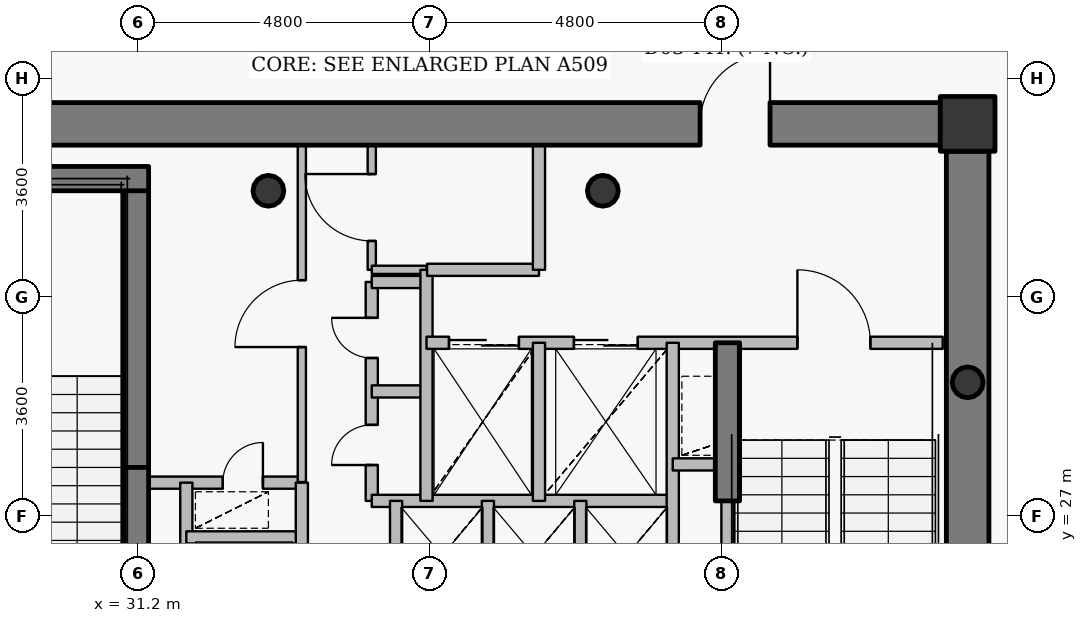
"""IFC4 building model, lengths in metres.
Left out: names, types, materials, properties, quantities, classifications, styles, units other than length and angle.
Written with IfcOpenShell. Run it as: python <this file> out.ifc"""

import sys

from ifc_helpers import new_model, si_unit, direction, frame, frame_2d, origin, origin_2d, place, context, subcontext, project, spatial, rectangle, hollow_circle, extrude, source, transform, mapped, element, fill, save


model = new_model("IFC4")
c1 = context("Model", 3, precision=1e-05, world=origin(), true_north=direction((0.0, 1.0)))
c2 = subcontext(c1, "Body", "Model", "MODEL_VIEW")
j1 = project(units=[si_unit("LENGTHUNIT", "METRE"), si_unit("PLANEANGLEUNIT", "RADIAN")], contexts=[c1])
p1 = place(None, origin())
s1 = spatial("IfcSite", under=j1, at=p1, CompositionType="ELEMENT")
p2 = place(p1, origin())
s2 = spatial("IfcBuilding", under=s1, at=p2, CompositionType="ELEMENT")
p3 = place(p2, frame((0.0, 0.0, 331.6)))
s3 = spatial("IfcBuildingStorey", under=s2, at=p3, CompositionType="ELEMENT", Elevation=331.6)
p4 = place(p3, frame((44.85, 33.45, 0.0), z_axis=(0.0, 0.0, 1.0), x_axis=(1.0, 0.0, 0.0)))
e1 = element("IfcColumn", 1, at=p4, inside=s3, PredefinedType="COLUMN", context=c2, shape_type="SweptSolid", body=[
    extrude(rectangle(XDim=0.9, YDim=0.9, at=origin_2d()), origin(), (0.0, 0.0, 1.0), 3.8),
])
for number, where, z_axis, x_axis in (
    (2, (38.85, 32.35, 0.0), (0.0, 0.0, 1.0), (1.0, 0.0, 0.0)),
    (3, (33.35, 32.35, 0.0), (0.0, 0.0, 1.0), (1.0, 0.0, 0.0)),
):
    element("IfcColumn", number, at=place(p3, frame(where, z_axis=z_axis, x_axis=x_axis)), inside=s3, PredefinedType="COLUMN", context=c2, shape_type="SweptSolid", body=[
        extrude(hollow_circle(Radius=0.254, WallThickness=0.02, at=origin_2d()), origin(), (0.0, 0.0, 1.0), 3.8),
    ])
p5 = place(p3, frame((31.18, 27.8, 0.0), z_axis=(0.0, 0.0, 1.0), x_axis=(0.0, 1.0, 0.0)))
e4 = element("IfcWall", 4, at=p5, inside=s3, PredefinedType="SHEAR", context=c2, shape_type="SweptSolid", body=[
    extrude(rectangle(XDim=4.75, YDim=0.4, at=frame_2d((2.375, 0.0))), origin(), (0.0, 0.0, 1.0), 3.8),
])
p6 = place(p3, frame((27.25, 32.55, 0.0), z_axis=(0.0, 0.0, 1.0), x_axis=(1.0, 0.0, 0.0)))
e5 = element("IfcWall", 5, at=p6, inside=s3, PredefinedType="SHEAR", context=c2, shape_type="SweptSolid", body=[
    extrude(rectangle(XDim=4.13, YDim=0.4, at=frame_2d((2.065, 0.0))), origin(), (0.0, 0.0, 1.0), 3.8),
])
p7 = place(p3, frame((27.6, 33.45, 0.0), z_axis=(0.0, 0.0, 1.0), x_axis=(1.0, 0.0, 0.0)))
e6 = element("IfcWall", 6, at=p7, inside=s3, PredefinedType="SHEAR", context=c2, shape_type="SweptSolid", body=[
    extrude(rectangle(XDim=16.8, YDim=0.7, at=frame_2d((8.4, 0.0))), origin(), (0.0, 0.0, 1.0), 3.1),
])
p8 = place(p7, frame((12.85, 0.0, 0.0)))
e7 = element("IfcOpeningElement", 7, at=p8, cuts=e6, PredefinedType="OPENING", context=c2, shape_type="SweptSolid", body=[
    extrude(rectangle(XDim=1.15, YDim=2.15, at=origin_2d()), frame((0.575, 0.36, 1.075), z_axis=(0.0, -1.0, 0.0), x_axis=(1.0, 0.0, 0.0)), (0.0, 0.0, 1.0), 0.72),
])
p9 = place(p3, frame((44.85, 33.0, 0.0), z_axis=(0.0, 0.0, 1.0), x_axis=(0.0, -1.0, 0.0)))
e8 = element("IfcWall", 8, at=p9, inside=s3, PredefinedType="SHEAR", context=c2, shape_type="SweptSolid", body=[
    extrude(rectangle(XDim=12.0, YDim=0.7, at=frame_2d((6.0, 0.0))), origin(), (0.0, 0.0, 1.0), 3.1),
])
p10 = place(p3, frame((31.18, 25.55, 0.0), z_axis=(0.0, 0.0, 1.0), x_axis=(0.0, 1.0, 0.0)))
e9 = element("IfcWall", 9, at=p10, inside=s3, PredefinedType="SHEAR", context=c2, shape_type="SweptSolid", body=[
    extrude(rectangle(XDim=2.25, YDim=0.4, at=frame_2d((1.125, 0.0))), origin(), (0.0, 0.0, 1.0), 3.15),
])
p11 = place(p3, frame((40.9, 27.25, 0.0), z_axis=(0.0, 0.0, 1.0), x_axis=(0.0, 1.0, 0.0)))
e10 = element("IfcWall", 10, at=p11, inside=s3, PredefinedType="SHEAR", context=c2, shape_type="SweptSolid", body=[
    extrude(rectangle(XDim=2.6, YDim=0.4, at=frame_2d((1.3, 0.0))), origin(), (0.0, 0.0, 1.0), 3.15),
])
p12 = place(p3, frame((44.85, 29.2, 0.0), z_axis=(0.0, 0.0, 1.0), x_axis=(1.0, 0.0, 0.0)))
e11 = element("IfcColumn", 11, at=p12, inside=s3, PredefinedType="COLUMN", context=c2, shape_type="SweptSolid", body=[
    extrude(hollow_circle(Radius=0.254, WallThickness=0.02, at=origin_2d()), origin(), (0.0, 0.0, 1.0), 3.8),
])
p13 = place(p3, frame((31.1, 27.55, 0.0), z_axis=(0.0, 0.0, 1.0), x_axis=(1.0, 0.0, 0.0)))
e12 = element("IfcWall", 12, at=p13, inside=s3, PredefinedType="PARTITIONING", context=c2, shape_type="SweptSolid", body=[
    extrude(rectangle(XDim=2.8, YDim=0.2, at=frame_2d((1.4, 0.0))), origin(), (0.0, 0.0, 1.0), 3.135),
])
p14 = place(p13, frame((1.5, 0.0, 0.0)))
e13 = element("IfcOpeningElement", 13, at=p14, cuts=e12, PredefinedType="OPENING", context=c2, shape_type="SweptSolid", body=[
    extrude(rectangle(XDim=0.66, YDim=2.05, at=origin_2d()), frame((0.33, 0.11, 1.025), z_axis=(0.0, -1.0, 0.0), x_axis=(1.0, 0.0, 0.0)), (0.0, 0.0, 1.0), 0.22),
])
p15 = place(p3, frame((32.0, 24.1, 0.0), z_axis=(0.0, 0.0, 1.0), x_axis=(0.0, 1.0, 0.0)))
e14 = element("IfcWall", 14, at=p15, inside=s3, PredefinedType="PARTITIONING", context=c2, shape_type="SweptSolid", body=[
    extrude(rectangle(XDim=3.45, YDim=0.2, at=frame_2d((1.725, 0.0))), origin(), (0.0, 0.0, 1.0), 3.55),
])
p16 = place(p3, frame((32.0, 26.65, 0.0), z_axis=(0.0, 0.0, 1.0), x_axis=(1.0, 0.0, 0.0)))
e15 = element("IfcWall", 15, at=p16, inside=s3, PredefinedType="PARTITIONING", context=c2, shape_type="SweptSolid", body=[
    extrude(rectangle(XDim=1.9, YDim=0.2, at=frame_2d((0.95, 0.0))), origin(), (0.0, 0.0, 1.0), 3.135),
])
p17 = place(p3, frame((33.9, 20.9, 0.0), z_axis=(0.0, 0.0, 1.0), x_axis=(0.0, 1.0, 0.0)))
e16 = element("IfcWall", 16, at=p17, inside=s3, PredefinedType="PARTITIONING", context=c2, shape_type="SweptSolid", body=[
    extrude(rectangle(XDim=6.65, YDim=0.2, at=frame_2d((3.325, 0.0))), origin(), (0.0, 0.0, 1.0), 3.135),
])
p18 = place(p3, frame((33.9, 27.56, 0.0), z_axis=(0.0, 0.0, 1.0), x_axis=(0.0, 1.0, 0.0)))
e17 = element("IfcWall", 17, at=p18, inside=s3, PredefinedType="PARTITIONING", context=c2, shape_type="SweptSolid", body=[
    extrude(rectangle(XDim=5.54, YDim=0.135, at=frame_2d((2.77, 0.0))), origin(), (0.0, 0.0, 1.0), 3.135),
])
p19 = place(p18, frame((2.22, 0.0, 0.0)))
e18 = element("IfcOpeningElement", 18, at=p19, cuts=e17, PredefinedType="OPENING", context=c2, shape_type="SweptSolid", body=[
    extrude(rectangle(XDim=1.1, YDim=2.15, at=origin_2d()), frame((0.55, 0.078, 1.075), z_axis=(0.0, -1.0, 0.0), x_axis=(1.0, 0.0, 0.0)), (0.0, 0.0, 1.0), 0.155),
])
p20 = place(p3, frame((35.05, 27.25, 0.0), z_axis=(0.0, 0.0, 1.0), x_axis=(0.0, 1.0, 0.0)))
e19 = element("IfcWall", 19, at=p20, inside=s3, PredefinedType="PARTITIONING", context=c2, shape_type="SweptSolid", body=[
    extrude(rectangle(XDim=3.6, YDim=0.2, at=frame_2d((1.8, 0.0))), origin(), (0.0, 0.0, 1.0), 3.55),
])
p21 = place(p20, frame((0.59, 0.0, 0.0)))
e20 = element("IfcOpeningElement", 20, at=p21, cuts=e19, PredefinedType="OPENING", context=c2, shape_type="SweptSolid", body=[
    extrude(rectangle(XDim=0.66, YDim=2.05, at=origin_2d()), frame((0.33, 0.11, 1.025), z_axis=(0.0, -1.0, 0.0), x_axis=(1.0, 0.0, 0.0)), (0.0, 0.0, 1.0), 0.22),
])
p22 = place(p20, frame((2.35, 0.0, 0.0)))
e21 = element("IfcOpeningElement", 21, at=p22, cuts=e19, PredefinedType="OPENING", context=c2, shape_type="SweptSolid", body=[
    extrude(rectangle(XDim=0.66, YDim=2.05, at=origin_2d()), frame((0.33, 0.11, 1.025), z_axis=(0.0, -1.0, 0.0), x_axis=(1.0, 0.0, 0.0)), (0.0, 0.0, 1.0), 0.22),
])
p23 = place(p3, frame((35.05, 27.25, 0.0), z_axis=(0.0, 0.0, 1.0), x_axis=(1.0, 0.0, 0.0)))
e22 = element("IfcWall", 22, at=p23, inside=s3, PredefinedType="PARTITIONING", context=c2, shape_type="SweptSolid", body=[
    extrude(rectangle(XDim=4.95, YDim=0.2, at=frame_2d((2.475, 0.0))), origin(), (0.0, 0.0, 1.0), 3.135),
])
for number, where, z_axis, x_axis in (
    (23, (35.05, 29.05, 0.0), (0.0, 0.0, 1.0), (1.0, 0.0, 0.0)),
    (24, (35.05, 30.85, 0.0), (0.0, 0.0, 1.0), (1.0, 0.0, 0.0)),
):
    element("IfcWall", number, at=place(p3, frame(where, z_axis=z_axis, x_axis=x_axis)), inside=s3, PredefinedType="PARTITIONING", context=c2, shape_type="SweptSolid", body=[
        extrude(rectangle(XDim=0.9, YDim=0.2, at=frame_2d((0.45, 0.0))), origin(), (0.0, 0.0, 1.0), 3.55),
    ])
p24 = place(p3, frame((35.05, 31.05, 0.0), z_axis=(0.0, 0.0, 1.0), x_axis=(0.0, 1.0, 0.0)))
e25 = element("IfcWall", 25, at=p24, inside=s3, PredefinedType="PARTITIONING", context=c2, shape_type="SweptSolid", body=[
    extrude(rectangle(XDim=2.05, YDim=0.135, at=frame_2d((1.025, 0.0))), origin(), (0.0, 0.0, 1.0), 3.135),
])
p25 = place(p24, frame((0.475, 0.0, 0.0)))
e26 = element("IfcOpeningElement", 26, at=p25, cuts=e25, PredefinedType="OPENING", context=c2, shape_type="SweptSolid", body=[
    extrude(rectangle(XDim=1.1, YDim=2.15, at=origin_2d()), frame((0.55, 0.078, 1.075), z_axis=(0.0, -1.0, 0.0), x_axis=(1.0, 0.0, 0.0)), (0.0, 0.0, 1.0), 0.155),
])
p26 = place(p3, frame((35.05, 31.05, 0.0), z_axis=(0.0, 0.0, 1.0), x_axis=(1.0, 0.0, 0.0)))
e27 = element("IfcWall", 27, at=p26, inside=s3, PredefinedType="PARTITIONING", context=c2, shape_type="SweptSolid", body=[
    extrude(rectangle(XDim=0.9, YDim=0.135, at=frame_2d((0.45, 0.0))), origin(), (0.0, 0.0, 1.0), 3.55),
])
p27 = place(p3, frame((35.45, 25.45, 0.0), z_axis=(0.0, 0.0, 1.0), x_axis=(0.0, 1.0, 0.0)))
e28 = element("IfcWall", 28, at=p27, inside=s3, PredefinedType="PARTITIONING", context=c2, shape_type="SweptSolid", body=[
    extrude(rectangle(XDim=1.8, YDim=0.2, at=frame_2d((0.9, 0.0))), origin(), (0.0, 0.0, 1.0), 3.55),
])
p28 = place(p3, frame((35.95, 27.25, 0.0), z_axis=(0.0, 0.0, 1.0), x_axis=(0.0, 1.0, 0.0)))
e29 = element("IfcWall", 29, at=p28, inside=s3, PredefinedType="PARTITIONING", context=c2, shape_type="SweptSolid", body=[
    extrude(rectangle(XDim=3.8, YDim=0.2, at=frame_2d((1.9, 0.0))), origin(), (0.0, 0.0, 1.0), 3.55),
])
p29 = place(p3, frame((35.95, 29.85, 0.0), z_axis=(0.0, 0.0, 1.0), x_axis=(1.0, 0.0, 0.0)))
e30 = element("IfcWall", 30, at=p29, inside=s3, PredefinedType="PARTITIONING", context=c2, shape_type="SweptSolid", body=[
    extrude(rectangle(XDim=8.49, YDim=0.2, at=frame_2d((4.245, 0.0))), origin(), (0.0, 0.0, 1.0), 3.135),
])
p30 = place(p29, frame((6.1, 0.0, 0.0)))
e31 = element("IfcOpeningElement", 31, at=p30, cuts=e30, PredefinedType="OPENING", context=c2, shape_type="SweptSolid", body=[
    extrude(rectangle(XDim=1.2, YDim=2.15, at=origin_2d()), frame((0.6, 0.11, 1.075), z_axis=(0.0, -1.0, 0.0), x_axis=(1.0, 0.0, 0.0)), (0.0, 0.0, 1.0), 0.22),
])
p31 = place(p29, frame((0.37, 0.0, 0.0)))
e32 = element("IfcOpeningElement", 32, at=p31, cuts=e30, PredefinedType="OPENING", context=c2, shape_type="SweptSolid", body=[
    extrude(rectangle(XDim=1.15, YDim=2.15, at=origin_2d()), frame((0.575, 0.11, 1.075), z_axis=(0.0, -1.0, 0.0), x_axis=(1.0, 0.0, 0.0)), (0.0, 0.0, 1.0), 0.22),
])
p32 = place(p29, frame((2.425, 0.0, 0.0)))
e33 = element("IfcOpeningElement", 33, at=p32, cuts=e30, PredefinedType="OPENING", context=c2, shape_type="SweptSolid", body=[
    extrude(rectangle(XDim=1.05, YDim=2.15, at=origin_2d()), frame((0.525, 0.11, 1.075), z_axis=(0.0, -1.0, 0.0), x_axis=(1.0, 0.0, 0.0)), (0.0, 0.0, 1.0), 0.22),
])
p33 = place(p3, frame((35.96, 31.05, 0.0), z_axis=(0.0, 0.0, 1.0), x_axis=(1.0, 0.0, 0.0)))
e34 = element("IfcWall", 34, at=p33, inside=s3, PredefinedType="PARTITIONING", context=c2, shape_type="SweptSolid", body=[
    extrude(rectangle(XDim=1.84, YDim=0.2, at=frame_2d((0.92, 0.0))), origin(), (0.0, 0.0, 1.0), 3.55),
])
p34 = place(p3, frame((36.96, 25.45, 0.0), z_axis=(0.0, 0.0, 1.0), x_axis=(0.0, 1.0, 0.0)))
e35 = element("IfcWall", 35, at=p34, inside=s3, PredefinedType="PARTITIONING", context=c2, shape_type="SweptSolid", body=[
    extrude(rectangle(XDim=1.8, YDim=0.2, at=frame_2d((0.9, 0.0))), origin(), (0.0, 0.0, 1.0), 3.55),
])
p35 = place(p3, frame((37.8, 27.25, 0.0), z_axis=(0.0, 0.0, 1.0), x_axis=(0.0, 1.0, 0.0)))
e36 = element("IfcWall", 36, at=p35, inside=s3, PredefinedType="PARTITIONING", context=c2, shape_type="SweptSolid", body=[
    extrude(rectangle(XDim=2.6, YDim=0.2, at=frame_2d((1.3, 0.0))), origin(), (0.0, 0.0, 1.0), 3.55),
])
p36 = place(p3, frame((37.8, 31.05, 0.0), z_axis=(0.0, 0.0, 1.0), x_axis=(0.0, 1.0, 0.0)))
e37 = element("IfcWall", 37, at=p36, inside=s3, PredefinedType="PARTITIONING", context=c2, shape_type="SweptSolid", body=[
    extrude(rectangle(XDim=2.05, YDim=0.2, at=frame_2d((1.025, 0.0))), origin(), (0.0, 0.0, 1.0), 3.135),
])
p37 = place(p3, frame((38.48, 25.45, 0.0), z_axis=(0.0, 0.0, 1.0), x_axis=(0.0, 1.0, 0.0)))
e38 = element("IfcWall", 38, at=p37, inside=s3, PredefinedType="PARTITIONING", context=c2, shape_type="SweptSolid", body=[
    extrude(rectangle(XDim=1.8, YDim=0.2, at=frame_2d((0.9, 0.0))), origin(), (0.0, 0.0, 1.0), 3.55),
])
p38 = place(p3, frame((40.0, 25.45, 0.0), z_axis=(0.0, 0.0, 1.0), x_axis=(0.0, 1.0, 0.0)))
e39 = element("IfcWall", 39, at=p38, inside=s3, PredefinedType="PARTITIONING", context=c2, shape_type="SweptSolid", body=[
    extrude(rectangle(XDim=4.4, YDim=0.2, at=frame_2d((2.2, 0.0))), origin(), (0.0, 0.0, 1.0), 3.55),
])
p39 = place(p3, frame((40.0, 27.85, 0.0), z_axis=(0.0, 0.0, 1.0), x_axis=(1.0, 0.0, 0.0)))
e40 = element("IfcWall", 40, at=p39, inside=s3, PredefinedType="PARTITIONING", context=c2, shape_type="SweptSolid", body=[
    extrude(rectangle(XDim=0.9, YDim=0.2, at=frame_2d((0.45, 0.0))), origin(), (0.0, 0.0, 1.0), 3.55),
])
p40 = place(p3, frame((40.9, 21.33, 0.0), z_axis=(0.0, 0.0, 1.0), x_axis=(0.0, 1.0, 0.0)))
e41 = element("IfcWall", 41, at=p40, inside=s3, PredefinedType="PARTITIONING", context=c2, shape_type="SweptSolid", body=[
    extrude(rectangle(XDim=5.91, YDim=0.2, at=frame_2d((2.955, 0.0))), origin(), (0.0, 0.0, 1.0), 3.085),
])
p41 = place(p3, frame((45.2, 33.8, 0.0), z_axis=(0.0, 0.0, 1.0), x_axis=(-1.0, 0.0, 0.0)))
e42 = element("IfcWall", 42, at=p41, inside=s3, PredefinedType="PARTITIONING", context=c2, shape_type="SweptSolid", body=[
    extrude(rectangle(XDim=0.79, YDim=0.135, at=frame_2d((0.395, 0.0))), origin(), (0.0, 0.0, 1.0), 3.085),
])
p42 = place(p3, frame((45.2, 33.01, 0.0), z_axis=(0.0, 0.0, 1.0), x_axis=(0.0, 1.0, 0.0)))
e43 = element("IfcWall", 43, at=p42, inside=s3, PredefinedType="PARTITIONING", context=c2, shape_type="SweptSolid", body=[
    extrude(rectangle(XDim=0.482, YDim=0.135, at=frame_2d((0.241, 0.0))), origin(), (0.0, 0.0, 1.0), 3.55),
])
m1 = source(origin(), c2, "Body", "SweptSolid", [
    extrude(rectangle(XDim=1.15, YDim=2.15, at=origin_2d()), frame((0.575, 0.025, 1.075), z_axis=(0.0, -1.0, 0.0), x_axis=(1.0, 0.0, 0.0)), (0.0, 0.0, 1.0), 0.05),
])
p43 = place(p8, origin())
e44 = element("IfcDoor", 44, at=p43, inside=s3, OperationType="SINGLE_SWING_RIGHT", PredefinedType="DOOR", context=c2, shape_type="MappedRepresentation", body=[
    mapped(m1, transform((0.0, 0.0, 0.0), x_axis=(1.0, 0.0, 0.0), y_axis=(0.0, 1.0, 0.0), z_axis=(0.0, 0.0, 1.0), scale=1.0)),
])
fill(e7, e44)
m2 = source(origin(), c2, "Body", "SweptSolid", [
    extrude(rectangle(XDim=1.2, YDim=2.15, at=origin_2d()), frame((0.6, 0.025, 1.075), z_axis=(0.0, -1.0, 0.0), x_axis=(1.0, 0.0, 0.0)), (0.0, 0.0, 1.0), 0.05),
])
p44 = place(p30, origin())
e45 = element("IfcDoor", 45, at=p44, inside=s3, OperationType="SINGLE_SWING_LEFT", PredefinedType="DOOR", context=c2, shape_type="MappedRepresentation", body=[
    mapped(m2, transform((0.0, 0.0, 0.0), x_axis=(1.0, 0.0, 0.0), y_axis=(0.0, 1.0, 0.0), z_axis=(0.0, 0.0, 1.0), scale=1.0)),
])
fill(e31, e45)
m3 = source(origin(), c2, "Body", "SweptSolid", [
    extrude(rectangle(XDim=1.15, YDim=2.15, at=origin_2d()), frame((0.575, 0.025, 1.075), z_axis=(0.0, -1.0, 0.0), x_axis=(1.0, 0.0, 0.0)), (0.0, 0.0, 1.0), 0.05),
])
p45 = place(p31, origin())
e46 = element("IfcDoor", 46, at=p45, inside=s3, OperationType="DOUBLE_DOOR_SLIDING", PredefinedType="USERDEFINED", context=c2, shape_type="MappedRepresentation", body=[
    mapped(m3, transform((0.0, 0.0, 0.0), x_axis=(1.0, 0.0, 0.0), y_axis=(0.0, 1.0, 0.0), z_axis=(0.0, 0.0, 1.0), scale=1.0)),
])
fill(e32, e46)
m4 = source(origin(), c2, "Body", "SweptSolid", [
    extrude(rectangle(XDim=1.05, YDim=2.15, at=origin_2d()), frame((0.525, 0.025, 1.075), z_axis=(0.0, -1.0, 0.0), x_axis=(1.0, 0.0, 0.0)), (0.0, 0.0, 1.0), 0.05),
])
p46 = place(p32, origin())
e47 = element("IfcDoor", 47, at=p46, inside=s3, OperationType="DOUBLE_DOOR_SLIDING", PredefinedType="USERDEFINED", context=c2, shape_type="MappedRepresentation", body=[
    mapped(m4, transform((0.0, 0.0, 0.0), x_axis=(1.0, 0.0, 0.0), y_axis=(0.0, 1.0, 0.0), z_axis=(0.0, 0.0, 1.0), scale=1.0)),
])
fill(e33, e47)
m5 = source(origin(), c2, "Body", "SweptSolid", [
    extrude(rectangle(XDim=0.66, YDim=2.05, at=origin_2d()), frame((0.33, 0.025, 1.025), z_axis=(0.0, -1.0, 0.0), x_axis=(1.0, 0.0, 0.0)), (0.0, 0.0, 1.0), 0.05),
])
p47 = place(p21, origin())
e48 = element("IfcDoor", 48, at=p47, inside=s3, OperationType="SINGLE_SWING_LEFT", PredefinedType="USERDEFINED", context=c2, shape_type="MappedRepresentation", body=[
    mapped(m5, transform((0.0, 0.0, 0.0), x_axis=(1.0, 0.0, 0.0), y_axis=(0.0, 1.0, 0.0), z_axis=(0.0, 0.0, 1.0), scale=1.0)),
])
fill(e20, e48)
p48 = place(p22, origin())
e49 = element("IfcDoor", 49, at=p48, inside=s3, OperationType="SINGLE_SWING_RIGHT", PredefinedType="USERDEFINED", context=c2, shape_type="MappedRepresentation", body=[
    mapped(m5, transform((0.0, 0.0, 0.0), x_axis=(1.0, 0.0, 0.0), y_axis=(0.0, 1.0, 0.0), z_axis=(0.0, 0.0, 1.0), scale=1.0)),
])
fill(e21, e49)
m6 = source(origin(), c2, "Body", "SweptSolid", [
    extrude(rectangle(XDim=1.1, YDim=2.15, at=origin_2d()), frame((0.55, 0.025, 1.075), z_axis=(0.0, -1.0, 0.0), x_axis=(1.0, 0.0, 0.0)), (0.0, 0.0, 1.0), 0.05),
])
p49 = place(p19, origin())
e50 = element("IfcDoor", 50, at=p49, inside=s3, OperationType="SINGLE_SWING_LEFT", PredefinedType="DOOR", context=c2, shape_type="MappedRepresentation", body=[
    mapped(m6, transform((0.0, 0.0, 0.0), x_axis=(1.0, 0.0, 0.0), y_axis=(0.0, 1.0, 0.0), z_axis=(0.0, 0.0, 1.0), scale=1.0)),
])
fill(e18, e50)
p50 = place(p25, origin())
e51 = element("IfcDoor", 51, at=p50, inside=s3, OperationType="SINGLE_SWING_RIGHT", PredefinedType="DOOR", context=c2, shape_type="MappedRepresentation", body=[
    mapped(m6, transform((0.0, 0.0, 0.0), x_axis=(1.0, 0.0, 0.0), y_axis=(0.0, 1.0, 0.0), z_axis=(0.0, 0.0, 1.0), scale=1.0)),
])
fill(e26, e51)
p51 = place(p14, origin())
e52 = element("IfcDoor", 52, at=p51, inside=s3, OperationType="SINGLE_SWING_RIGHT", PredefinedType="USERDEFINED", context=c2, shape_type="MappedRepresentation", body=[
    mapped(m5, transform((0.0, 0.0, 0.0), x_axis=(1.0, 0.0, 0.0), y_axis=(0.0, 1.0, 0.0), z_axis=(0.0, 0.0, 1.0), scale=1.0)),
])
fill(e13, e52)
save(model, sys.argv[1])
